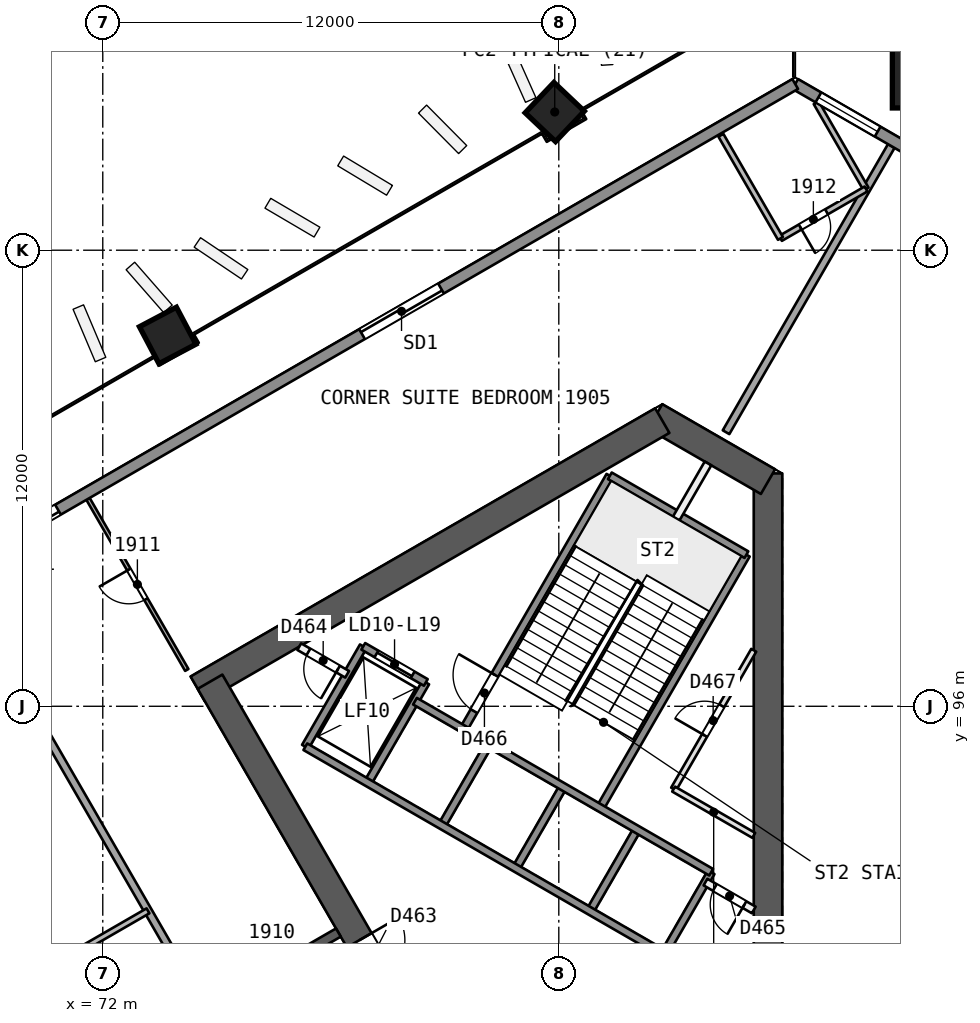
"""IFC4 building model, lengths in metres.
Left out: names, types, materials, properties, quantities, classifications, styles, units other than length and angle.
Written with IfcOpenShell. Run it as: python <this file> out.ifc"""

import sys

from ifc_helpers import new_model, si_unit, direction, frame, frame_2d, origin, origin_2d, place, context, subcontext, project, spatial, rectangle, extrude, element, fill, save


model = new_model("IFC4")
c1 = context("Model", 3, precision=1e-05, world=origin(), true_north=direction((0.0, 1.0)))
c2 = subcontext(c1, "Body", "Model", "MODEL_VIEW")
j1 = project(units=[si_unit("LENGTHUNIT", "METRE"), si_unit("PLANEANGLEUNIT", "RADIAN")], contexts=[c1])
p1 = place(None, origin())
s1 = spatial("IfcSite", under=j1, at=p1, CompositionType="ELEMENT")
p2 = place(p1, origin())
s2 = spatial("IfcBuilding", under=s1, at=p2, CompositionType="ELEMENT")
p3 = place(p2, frame((0.0, 0.0, 83.2)))
s3 = spatial("IfcBuildingStorey", under=s2, at=p3, CompositionType="ELEMENT", Elevation=83.2)
p4 = place(p3, frame((89.505, 88.169, 0.0), z_axis=(0.0, 0.0, 1.0), x_axis=(0.0, 1.0, 0.0)))
e1 = element("IfcWall", 1, at=p4, inside=s3, PredefinedType="SHEAR", context=c2, shape_type="SweptSolid", body=[
    extrude(rectangle(XDim=13.958, YDim=0.75, at=frame_2d((6.979, 0.0))), origin(), (0.0, 0.0, 1.0), 3.7),
])
p5 = place(p3, frame((89.505, 101.911, 0.0), z_axis=(0.0, 0.0, 1.0), x_axis=(-0.866017201164, 0.500014207086, 0.0)))
e2 = element("IfcWall", 2, at=p5, inside=s3, PredefinedType="SHEAR", context=c2, shape_type="SweptSolid", body=[
    extrude(rectangle(XDim=3.429, YDim=0.75, at=frame_2d((1.714, 0.0))), origin(), (0.0, 0.0, 1.0), 3.7),
])
p6 = place(p3, frame((86.723, 103.517, 0.0), z_axis=(0.0, 0.0, 1.0), x_axis=(-0.866020851292, -0.500007885066, 0.0)))
e3 = element("IfcWall", 3, at=p6, inside=s3, PredefinedType="SHEAR", context=c2, shape_type="SweptSolid", body=[
    extrude(rectangle(XDim=14.117, YDim=0.75, at=frame_2d((7.059, 0.0))), origin(), (0.0, 0.0, 1.0), 3.7),
])
p7 = place(p3, frame((74.822, 96.646, 0.0), z_axis=(0.0, 0.0, 1.0), x_axis=(0.499997052475, -0.866027105532, 0.0)))
e4 = element("IfcWall", 4, at=p7, inside=s3, PredefinedType="SHEAR", context=c2, shape_type="SweptSolid", body=[
    extrude(rectangle(XDim=10.005, YDim=0.75, at=frame_2d((5.002, 0.0))), origin(), (0.0, 0.0, 1.0), 3.7),
])
p8 = place(p7, frame((7.855, 0.0, 0.0)))
e5 = element("IfcOpeningElement", 5, at=p8, cuts=e4, PredefinedType="OPENING", context=c2, shape_type="SweptSolid", body=[
    extrude(rectangle(XDim=1.2, YDim=2.1, at=frame_2d((0.6, 1.05))), frame((0.0, 0.385, 0.0), z_axis=(0.0, -1.0, 0.0), x_axis=(1.0, 0.0, 0.0)), (0.0, 0.0, 1.0), 0.771),
])
p9 = place(p3, frame((78.2, 90.046, 0.0), z_axis=(0.0, 0.0, 1.0), x_axis=(-0.866026492143, -0.499998114903, 0.0)))
e6 = element("IfcWall", 6, at=p9, inside=s3, PredefinedType="SHEAR", context=c2, shape_type="SweptSolid", body=[
    extrude(rectangle(XDim=15.588, YDim=0.25, at=frame_2d((7.794, 0.0))), origin(), (0.0, 0.0, 1.0), 3.2),
])
p10 = place(p9, frame((1.527, 0.0, 0.0)))
e7 = element("IfcOpeningElement", 7, at=p10, cuts=e6, PredefinedType="OPENING", context=c2, shape_type="SweptSolid", body=[
    extrude(rectangle(XDim=1.0, YDim=2.1, at=frame_2d((0.5, 1.05))), frame((0.0, 0.135, 0.0), z_axis=(0.0, -1.0, 0.0), x_axis=(1.0, 0.0, 0.0)), (0.0, 0.0, 1.0), 0.271),
])
p11 = place(p9, frame((8.227, 0.0, 0.0)))
e8 = element("IfcOpeningElement", 8, at=p11, cuts=e6, PredefinedType="OPENING", context=c2, shape_type="SweptSolid", body=[
    extrude(rectangle(XDim=1.1, YDim=2.1, at=frame_2d((0.55, 1.05))), frame((0.0, 0.135, 0.0), z_axis=(0.0, -1.0, 0.0), x_axis=(1.0, 0.0, 0.0)), (0.0, 0.0, 1.0), 0.271),
])
p12 = place(p9, frame((12.594, 0.0, 0.0)))
e9 = element("IfcOpeningElement", 9, at=p12, cuts=e6, PredefinedType="OPENING", context=c2, shape_type="SweptSolid", body=[
    extrude(rectangle(XDim=1.0, YDim=2.1, at=frame_2d((0.5, 1.05))), frame((0.0, 0.135, 0.0), z_axis=(0.0, -1.0, 0.0), x_axis=(1.0, 0.0, 0.0)), (0.0, 0.0, 1.0), 0.271),
])
p13 = place(p3, frame((94.098, 113.079, 0.0), z_axis=(-0.017607037296, -0.030466109479, 0.999380712447), x_axis=(0.86581098392, -0.500371202332, 2.457e-09)))
e10 = element("IfcColumn", 10, at=p13, inside=s3, PredefinedType="COLUMN", context=c2, shape_type="SweptSolid", body=[
    extrude(rectangle(XDim=2.6, YDim=2.6, at=origin_2d()), origin(), (0.0, 0.0, 1.0), 3.702),
])
p14 = place(p3, frame((83.903, 111.67, 0.0), z_axis=(-0.00837646992, -0.028097450282, 0.999570091609), x_axis=(0.866168540849, 0.499298149106, 0.021293593943)))
e11 = element("IfcColumn", 11, at=p14, inside=s3, PredefinedType="COLUMN", context=c2, shape_type="SweptSolid", body=[
    extrude(rectangle(XDim=1.1, YDim=1.1, at=origin_2d()), origin(), (0.0, 0.0, 1.0), 3.702),
])
p15 = place(p3, frame((73.708, 105.784, 0.0), z_axis=(0.000857578916, -0.022824792675, 0.999739112668), x_axis=(0.866054076895, 0.49983648719, 0.010668737814)))
e12 = element("IfcColumn", 12, at=p15, inside=s3, PredefinedType="COLUMN", context=c2, shape_type="SweptSolid", body=[
    extrude(rectangle(XDim=1.1, YDim=1.1, at=origin_2d()), origin(), (0.0, 0.0, 1.0), 3.701),
])
p16 = place(p3, frame((92.749, 110.742, 0.0), z_axis=(0.0, 0.0, 1.0), x_axis=(-0.499980071345, -0.866036909293, 0.0)))
e13 = element("IfcWall", 13, at=p16, inside=s3, PredefinedType="PARTITIONING", context=c2, shape_type="SweptSolid", body=[
    extrude(rectangle(XDim=8.696, YDim=0.2, at=frame_2d((4.348, 0.0))), origin(), (0.0, 0.0, 1.0), 3.2),
])
p17 = place(p3, frame((74.21, 96.956, 0.0), z_axis=(0.0, 0.0, 1.0), x_axis=(-0.499973171224, 0.866040892832, 0.0)))
e14 = element("IfcWall", 14, at=p17, inside=s3, PredefinedType="PARTITIONING", context=c2, shape_type="SweptSolid", body=[
    extrude(rectangle(XDim=5.198, YDim=0.1, at=frame_2d((2.599, 0.0))), origin(), (0.0, 0.0, 1.0), 3.2),
])
p18 = place(p17, frame((2.149, 0.0, 0.0)))
e15 = element("IfcOpeningElement", 15, at=p18, cuts=e14, PredefinedType="OPENING", context=c2, shape_type="SweptSolid", body=[
    extrude(rectangle(XDim=0.9, YDim=2.1, at=frame_2d((0.45, 1.05))), frame((0.0, 0.061, 0.0), z_axis=(0.0, -1.0, 0.0), x_axis=(1.0, 0.0, 0.0)), (0.0, 0.0, 1.0), 0.121),
])
p19 = place(p3, frame((68.102, 99.431, 0.0), z_axis=(0.0, 0.0, 1.0), x_axis=(0.499992964734, -0.866029465559, 0.0)))
e16 = element("IfcWall", 16, at=p19, inside=s3, PredefinedType="PARTITIONING", context=c2, shape_type="SweptSolid", body=[
    extrude(rectangle(XDim=13.177, YDim=0.2, at=frame_2d((6.588, 0.0))), origin(), (0.0, 0.0, 1.0), 3.2),
])
p20 = place(p3, frame((90.772, 111.883, 0.0), z_axis=(0.0, 0.0, 1.0), x_axis=(0.500041944083, -0.866001186003, 0.0)))
e17 = element("IfcWall", 17, at=p20, inside=s3, PredefinedType="PARTITIONING", context=c2, shape_type="SweptSolid", body=[
    extrude(rectangle(XDim=2.624, YDim=0.15, at=frame_2d((1.312, 0.0))), origin(), (0.0, 0.0, 1.0), 3.2),
])
p21 = place(p3, frame((92.084, 109.611, 0.0), z_axis=(0.0, 0.0, 1.0), x_axis=(-0.866021400173, -0.500006934395, 0.0)))
e18 = element("IfcWall", 18, at=p21, inside=s3, PredefinedType="PARTITIONING", context=c2, shape_type="SweptSolid", body=[
    extrude(rectangle(XDim=2.6, YDim=0.15, at=frame_2d((1.3, 0.0))), origin(), (0.0, 0.0, 1.0), 3.2),
])
p22 = place(p21, frame((1.2, 0.0, 0.0)))
e19 = element("IfcOpeningElement", 19, at=p22, cuts=e18, PredefinedType="OPENING", context=c2, shape_type="SweptSolid", body=[
    extrude(rectangle(XDim=0.8, YDim=2.1, at=frame_2d((0.4, 1.05))), frame((0.0, 0.085, 0.0), z_axis=(0.0, -1.0, 0.0), x_axis=(1.0, 0.0, 0.0)), (0.0, 0.0, 1.0), 0.171),
])
p23 = place(p3, frame((89.833, 108.311, 0.0), z_axis=(0.0, 0.0, 1.0), x_axis=(-0.499967424082, 0.866044210682, 0.0)))
e20 = element("IfcWall", 20, at=p23, inside=s3, PredefinedType="PARTITIONING", context=c2, shape_type="SweptSolid", body=[
    extrude(rectangle(XDim=3.135, YDim=0.15, at=frame_2d((1.567, 0.0))), origin(), (0.0, 0.0, 1.0), 3.2),
])
p24 = place(p3, frame((70.678, 89.167, 0.0), z_axis=(0.0, 0.0, 1.0), x_axis=(0.866032775405, 0.499987231761, 0.0)))
e21 = element("IfcWall", 21, at=p24, inside=s3, PredefinedType="PARTITIONING", context=c2, shape_type="SweptSolid", body=[
    extrude(rectangle(XDim=2.9, YDim=0.15, at=frame_2d((1.45, 0.0))), origin(), (0.0, 0.0, 1.0), 3.2),
])
p25 = place(p3, frame((90.221, 112.374, 0.0), z_axis=(0.0, 0.0, 1.0), x_axis=(0.866027298819, -0.49999671769, 0.0)))
e22 = element("IfcWall", 22, at=p25, inside=s3, PredefinedType="SOLIDWALL", context=c2, shape_type="SweptSolid", body=[
    extrude(rectangle(XDim=6.01, YDim=0.3, at=frame_2d((3.005, 0.0))), origin(), (0.0, 0.0, 1.0), 3.2),
])
p26 = place(p25, frame((0.705, 0.0, 0.9)))
e23 = element("IfcOpeningElement", 23, at=p26, cuts=e22, PredefinedType="OPENING", context=c2, shape_type="SweptSolid", body=[
    extrude(rectangle(XDim=1.8, YDim=1.5, at=frame_2d((0.9, 0.75))), frame((0.0, 0.161, 0.0), z_axis=(0.0, -1.0, 0.0), x_axis=(1.0, 0.0, 0.0)), (0.0, 0.0, 1.0), 0.321),
])
p27 = place(p25, frame((3.651, 0.0, 0.9)))
e24 = element("IfcOpeningElement", 24, at=p27, cuts=e22, PredefinedType="OPENING", context=c2, shape_type="SweptSolid", body=[
    extrude(rectangle(XDim=1.8, YDim=1.5, at=frame_2d((0.9, 0.75))), frame((0.0, 0.161, 0.0), z_axis=(0.0, -1.0, 0.0), x_axis=(1.0, 0.0, 0.0)), (0.0, 0.0, 1.0), 0.321),
])
p28 = place(p3, frame((39.353, 83.005, 0.0), z_axis=(0.0, 0.0, 1.0), x_axis=(0.866025832118, 0.499999258104, 0.0)))
e25 = element("IfcWall", 25, at=p28, inside=s3, PredefinedType="SOLIDWALL", context=c2, shape_type="SweptSolid", body=[
    extrude(rectangle(XDim=58.737, YDim=0.3, at=frame_2d((29.368, 0.0))), origin(), (0.0, 0.0, 1.0), 3.2),
])
p29 = place(p28, frame((28.636, 0.0, 0.0)))
e26 = element("IfcOpeningElement", 26, at=p29, cuts=e25, PredefinedType="OPENING", context=c2, shape_type="SweptSolid", body=[
    extrude(rectangle(XDim=2.4, YDim=2.4, at=frame_2d((1.2, 1.2))), frame((0.0, 0.161, 0.0), z_axis=(0.0, -1.0, 0.0), x_axis=(1.0, 0.0, 0.0)), (0.0, 0.0, 1.0), 0.321),
])
p30 = place(p28, frame((33.936, 0.0, 0.0)))
e27 = element("IfcOpeningElement", 27, at=p30, cuts=e25, PredefinedType="OPENING", context=c2, shape_type="SweptSolid", body=[
    extrude(rectangle(XDim=2.4, YDim=2.4, at=frame_2d((1.2, 1.2))), frame((0.0, 0.161, 0.0), z_axis=(0.0, -1.0, 0.0), x_axis=(1.0, 0.0, 0.0)), (0.0, 0.0, 1.0), 0.321),
])
p31 = place(p28, frame((45.575, 0.0, 0.0)))
e28 = element("IfcOpeningElement", 28, at=p31, cuts=e25, PredefinedType="OPENING", context=c2, shape_type="SweptSolid", body=[
    extrude(rectangle(XDim=2.4, YDim=2.4, at=frame_2d((1.2, 1.2))), frame((0.0, 0.161, 0.0), z_axis=(0.0, -1.0, 0.0), x_axis=(1.0, 0.0, 0.0)), (0.0, 0.0, 1.0), 0.321),
])
p32 = place(p28, frame((22.868, 0.0, 0.0)))
e29 = element("IfcOpeningElement", 29, at=p32, cuts=e25, PredefinedType="OPENING", context=c2, shape_type="SweptSolid", body=[
    extrude(rectangle(XDim=2.4, YDim=2.4, at=frame_2d((1.2, 1.2))), frame((0.0, 0.161, 0.0), z_axis=(0.0, -1.0, 0.0), x_axis=(1.0, 0.0, 0.0)), (0.0, 0.0, 1.0), 0.321),
])
p33 = place(p28, frame((10.765, 0.0, 0.0)))
e30 = element("IfcOpeningElement", 30, at=p33, cuts=e25, PredefinedType="OPENING", context=c2, shape_type="SweptSolid", body=[
    extrude(rectangle(XDim=2.4, YDim=2.4, at=frame_2d((1.2, 1.2))), frame((0.0, 0.161, 0.0), z_axis=(0.0, -1.0, 0.0), x_axis=(1.0, 0.0, 0.0)), (0.0, 0.0, 1.0), 0.321),
])
p34 = place(p3, frame((86.77, 89.486, 0.0), z_axis=(0.0, 0.0, 1.0), x_axis=(0.499961042966, 0.86604789447, 0.0)))
e31 = element("IfcWall", 31, at=p34, inside=s3, PredefinedType="SOLIDWALL", context=c2, shape_type="SweptSolid", body=[
    extrude(rectangle(XDim=2.48, YDim=0.2, at=frame_2d((1.24, 0.0))), origin(), (0.0, 0.0, 1.0), 3.2),
])
p35 = place(p3, frame((87.021, 93.821, 0.0), z_axis=(0.0, 0.0, 1.0), x_axis=(0.499986337096, 0.866033291922, 0.0)))
e32 = element("IfcWall", 32, at=p35, inside=s3, PredefinedType="PARTITIONING", context=c2, shape_type="SweptSolid", body=[
    extrude(rectangle(XDim=4.218, YDim=0.15, at=frame_2d((2.109, 0.0))), origin(), (0.0, 0.0, 1.0), 3.2),
])
p36 = place(p35, frame((1.631, 0.0, 0.0)))
e33 = element("IfcOpeningElement", 33, at=p36, cuts=e32, PredefinedType="OPENING", context=c2, shape_type="SweptSolid", body=[
    extrude(rectangle(XDim=0.9, YDim=2.1, at=frame_2d((0.45, 1.05))), frame((0.0, 0.085, 0.0), z_axis=(0.0, -1.0, 0.0), x_axis=(1.0, 0.0, 0.0)), (0.0, 0.0, 1.0), 0.171),
])
p37 = place(p3, frame((84.821, 90.611, 0.0), z_axis=(0.0, 0.0, 1.0), x_axis=(0.499961042966, 0.86604789447, 0.0)))
e34 = element("IfcWall", 34, at=p37, inside=s3, PredefinedType="SOLIDWALL", context=c2, shape_type="SweptSolid", body=[
    extrude(rectangle(XDim=2.48, YDim=0.2, at=frame_2d((1.24, 0.0))), origin(), (0.0, 0.0, 1.0), 3.2),
])
p38 = place(p3, frame((85.087, 93.321, 0.0), z_axis=(0.0, 0.0, 1.0), x_axis=(0.500019787375, 0.866013979237, 0.0)))
e35 = element("IfcWall", 35, at=p38, inside=s3, PredefinedType="SOLIDWALL", context=c2, shape_type="SweptSolid", body=[
    extrude(rectangle(XDim=7.7, YDim=0.2, at=frame_2d((3.85, 0.0))), origin(), (0.0, 0.0, 1.0), 3.2),
])
p39 = place(p3, frame((82.873, 91.736, 0.0), z_axis=(0.0, 0.0, 1.0), x_axis=(0.499961042966, 0.86604789447, 0.0)))
e36 = element("IfcWall", 36, at=p39, inside=s3, PredefinedType="SOLIDWALL", context=c2, shape_type="SweptSolid", body=[
    extrude(rectangle(XDim=2.48, YDim=0.2, at=frame_2d((1.24, 0.0))), origin(), (0.0, 0.0, 1.0), 3.2),
])
p40 = place(p3, frame((87.09, 100.94, 0.0), z_axis=(0.0, 0.0, 1.0), x_axis=(0.499937194881, 0.866061661301, 0.0)))
e37 = element("IfcWall", 37, at=p40, inside=s3, PredefinedType="PARTITIONING", context=c2, shape_type="SweptSolid", body=[
    extrude(rectangle(XDim=1.673, YDim=0.2, at=frame_2d((0.836, 0.0))), origin(), (0.0, 0.0, 1.0), 3.2),
])
p41 = place(p3, frame((80.924, 92.861, 0.0), z_axis=(0.0, 0.0, 1.0), x_axis=(0.499961042966, 0.86604789447, 0.0)))
e38 = element("IfcWall", 38, at=p41, inside=s3, PredefinedType="SOLIDWALL", context=c2, shape_type="SweptSolid", body=[
    extrude(rectangle(XDim=2.48, YDim=0.2, at=frame_2d((1.24, 0.0))), origin(), (0.0, 0.0, 1.0), 3.2),
])
p42 = place(p3, frame((81.493, 95.396, 0.0), z_axis=(0.0, 0.0, 1.0), x_axis=(0.500006057782, 0.866021906294, 0.0)))
e39 = element("IfcWall", 39, at=p42, inside=s3, PredefinedType="SOLIDWALL", context=c2, shape_type="SweptSolid", body=[
    extrude(rectangle(XDim=7.7, YDim=0.2, at=frame_2d((3.85, 0.0))), origin(), (0.0, 0.0, 1.0), 3.2),
])
p43 = place(p42, frame((0.55, 0.0, 0.0)))
e40 = element("IfcOpeningElement", 40, at=p43, cuts=e39, PredefinedType="OPENING", context=c2, shape_type="SweptSolid", body=[
    extrude(rectangle(XDim=1.1, YDim=2.1, at=frame_2d((0.55, 1.05))), frame((0.0, 0.11, 0.0), z_axis=(0.0, -1.0, 0.0), x_axis=(1.0, 0.0, 0.0)), (0.0, 0.0, 1.0), 0.221),
])
for number, where, z_axis, x_axis in (
    (41, (78.976, 93.986, 0.0), (0.0, 0.0, 1.0), (0.5, 0.866, 0.0)),
    (42, (77.33, 94.936, 0.0), (0.0, 0.0, 1.0), (0.5, 0.866, 0.0)),
):
    element("IfcWall", number, at=place(p3, frame(where, z_axis=z_axis, x_axis=x_axis)), inside=s3, PredefinedType="SOLIDWALL", context=c2, shape_type="SweptSolid", body=[
        extrude(rectangle(XDim=3.05, YDim=0.2, at=frame_2d((1.525, 0.0))), origin(), (0.0, 0.0, 1.0), 3.2),
    ])
p44 = place(p3, frame((86.77, 89.486, 0.0), z_axis=(0.0, 0.0, 1.0), x_axis=(-0.86601811187, 0.500012629753, 0.0)))
e43 = element("IfcWall", 43, at=p44, inside=s3, PredefinedType="SOLIDWALL", context=c2, shape_type="SweptSolid", body=[
    extrude(rectangle(XDim=10.9, YDim=0.2, at=frame_2d((5.45, 0.0))), origin(), (0.0, 0.0, 1.0), 3.2),
])
p45 = place(p3, frame((89.13, 90.641, 0.0), z_axis=(0.0, 0.0, 1.0), x_axis=(-0.866094119867, 0.499880961361, 0.0)))
e44 = element("IfcWall", 44, at=p45, inside=s3, PredefinedType="PARTITIONING", context=c2, shape_type="SweptSolid", body=[
    extrude(rectangle(XDim=1.467, YDim=0.2, at=frame_2d((0.733, 0.0))), origin(), (0.0, 0.0, 1.0), 3.2),
])
p46 = place(p45, frame((0.283, 0.0, 0.0)))
e45 = element("IfcOpeningElement", 45, at=p46, cuts=e44, PredefinedType="OPENING", context=c2, shape_type="SweptSolid", body=[
    extrude(rectangle(XDim=0.9, YDim=2.1, at=frame_2d((0.45, 1.05))), frame((0.0, 0.11, 0.0), z_axis=(0.0, -1.0, 0.0), x_axis=(1.0, 0.0, 0.0)), (0.0, 0.0, 1.0), 0.221),
])
p47 = place(p3, frame((78.43, 96.841, 0.0), z_axis=(0.0, 0.0, 1.0), x_axis=(-0.866045896294, 0.499964504253, 0.0)))
e46 = element("IfcWall", 46, at=p47, inside=s3, PredefinedType="PARTITIONING", context=c2, shape_type="SweptSolid", body=[
    extrude(rectangle(XDim=1.455, YDim=0.2, at=frame_2d((0.728, 0.0))), origin(), (0.0, 0.0, 1.0), 3.2),
])
p48 = place(p47, frame((0.278, 0.0, 0.0)))
e47 = element("IfcOpeningElement", 47, at=p48, cuts=e46, PredefinedType="OPENING", context=c2, shape_type="SweptSolid", body=[
    extrude(rectangle(XDim=0.9, YDim=2.1, at=frame_2d((0.45, 1.05))), frame((0.0, 0.11, 0.0), z_axis=(0.0, -1.0, 0.0), x_axis=(1.0, 0.0, 0.0)), (0.0, 0.0, 1.0), 0.221),
])
p49 = place(p3, frame((88.01, 91.634, 0.0), z_axis=(0.0, 0.0, 1.0), x_axis=(-0.866024315419, 0.5000018851, 0.0)))
e48 = element("IfcWall", 48, at=p49, inside=s3, PredefinedType="SOLIDWALL", context=c2, shape_type="SweptSolid", body=[
    extrude(rectangle(XDim=9.0, YDim=0.2, at=frame_2d((4.5, 0.0))), origin(), (0.0, 0.0, 1.0), 3.2),
])
p50 = place(p3, frame((80.5, 96.627, 0.0), z_axis=(0.0, 0.0, 1.0), x_axis=(-0.86601224135, 0.500022797313, 0.0)))
e49 = element("IfcWall", 49, at=p50, inside=s3, PredefinedType="SOLIDWALL", context=c2, shape_type="SweptSolid", body=[
    extrude(rectangle(XDim=1.9, YDim=0.2, at=frame_2d((0.95, 0.0))), origin(), (0.0, 0.0, 1.0), 3.2),
])
p51 = place(p50, frame((0.4, 0.0, 0.0)))
e50 = element("IfcOpeningElement", 50, at=p51, cuts=e49, PredefinedType="OPENING", context=c2, shape_type="SweptSolid", body=[
    extrude(rectangle(XDim=1.1, YDim=2.1, at=frame_2d((0.55, 1.05))), frame((0.0, 0.11, 0.0), z_axis=(0.0, -1.0, 0.0), x_axis=(1.0, 0.0, 0.0)), (0.0, 0.0, 1.0), 0.221),
])
p52 = place(p3, frame((89.13, 92.604, 0.0), z_axis=(0.0, 0.0, 1.0), x_axis=(-0.866057046432, 0.499945189322, 0.0)))
e51 = element("IfcWall", 51, at=p52, inside=s3, PredefinedType="PARTITIONING", context=c2, shape_type="SweptSolid", body=[
    extrude(rectangle(XDim=2.435, YDim=0.15, at=frame_2d((1.218, 0.0))), origin(), (0.0, 0.0, 1.0), 3.2),
])
p53 = place(p3, frame((88.937, 99.99, 0.0), z_axis=(0.0, 0.0, 1.0), x_axis=(-0.866004344652, 0.500036473714, 0.0)))
e52 = element("IfcWall", 52, at=p53, inside=s3, PredefinedType="SOLIDWALL", context=c2, shape_type="SweptSolid", body=[
    extrude(rectangle(XDim=4.15, YDim=0.2, at=frame_2d((2.075, 0.0))), origin(), (0.0, 0.0, 1.0), 3.2),
])
p54 = place(p18, origin())
e53 = element("IfcDoor", 53, at=p54, inside=s3, OperationType="SINGLE_SWING_RIGHT", PredefinedType="NOTDEFINED", context=c2, shape_type="SweptSolid", body=[
    extrude(rectangle(XDim=0.9, YDim=2.1, at=frame_2d((0.45, 1.05))), frame((0.0, 0.025, 0.0), z_axis=(0.0, -1.0, 0.0), x_axis=(1.0, 0.0, 0.0)), (0.0, 0.0, 1.0), 0.05),
])
fill(e15, e53)
p55 = place(p22, origin())
e54 = element("IfcDoor", 54, at=p55, inside=s3, OperationType="SINGLE_SWING_RIGHT", PredefinedType="NOTDEFINED", context=c2, shape_type="SweptSolid", body=[
    extrude(rectangle(XDim=0.8, YDim=2.1, at=frame_2d((0.4, 1.05))), frame((0.0, 0.025, 0.0), z_axis=(0.0, -1.0, 0.0), x_axis=(1.0, 0.0, 0.0)), (0.0, 0.0, 1.0), 0.05),
])
fill(e19, e54)
p56 = place(p26, origin())
e55 = element("IfcWindow", 55, at=p56, inside=s3, PartitioningType="SINGLE_PANEL", PredefinedType="WINDOW", context=c2, shape_type="SweptSolid", body=[
    extrude(rectangle(XDim=1.8, YDim=1.5, at=frame_2d((0.9, 0.75))), frame((0.0, 0.03, 0.0), z_axis=(0.0, -1.0, 0.0), x_axis=(1.0, 0.0, 0.0)), (0.0, 0.0, 1.0), 0.06),
])
fill(e23, e55)
p57 = place(p30, origin())
e56 = element("IfcDoor", 56, at=p57, inside=s3, OperationType="SLIDING_TO_RIGHT", PredefinedType="NOTDEFINED", context=c2, shape_type="SweptSolid", body=[
    extrude(rectangle(XDim=2.4, YDim=2.4, at=frame_2d((1.2, 1.2))), frame((0.0, 0.025, 0.0), z_axis=(0.0, -1.0, 0.0), x_axis=(1.0, 0.0, 0.0)), (0.0, 0.0, 1.0), 0.05),
])
fill(e27, e56)
p58 = place(p31, origin())
e57 = element("IfcDoor", 57, at=p58, inside=s3, OperationType="SLIDING_TO_LEFT", PredefinedType="NOTDEFINED", context=c2, shape_type="SweptSolid", body=[
    extrude(rectangle(XDim=2.4, YDim=2.4, at=frame_2d((1.2, 1.2))), frame((0.0, 0.025, 0.0), z_axis=(0.0, -1.0, 0.0), x_axis=(1.0, 0.0, 0.0)), (0.0, 0.0, 1.0), 0.05),
])
fill(e28, e57)
p59 = place(p8, origin())
e58 = element("IfcDoor", 58, at=p59, inside=s3, OperationType="SINGLE_SWING_LEFT", PredefinedType="NOTDEFINED", context=c2, shape_type="SweptSolid", body=[
    extrude(rectangle(XDim=1.2, YDim=2.1, at=frame_2d((0.6, 1.05))), frame((0.0, 0.025, 0.0), z_axis=(0.0, -1.0, 0.0), x_axis=(1.0, 0.0, 0.0)), (0.0, 0.0, 1.0), 0.05),
])
fill(e5, e58)
p60 = place(p51, origin())
e59 = element("IfcDoor", 59, at=p60, inside=s3, OperationType="SLIDING_TO_RIGHT", PredefinedType="NOTDEFINED", context=c2, shape_type="SweptSolid", body=[
    extrude(rectangle(XDim=1.1, YDim=2.1, at=frame_2d((0.55, 1.05))), frame((0.0, 0.025, 0.0), z_axis=(0.0, -1.0, 0.0), x_axis=(1.0, 0.0, 0.0)), (0.0, 0.0, 1.0), 0.05),
])
fill(e50, e59)
p61 = place(p48, origin())
e60 = element("IfcDoor", 60, at=p61, inside=s3, OperationType="SINGLE_SWING_LEFT", PredefinedType="NOTDEFINED", context=c2, shape_type="SweptSolid", body=[
    extrude(rectangle(XDim=0.9, YDim=2.1, at=frame_2d((0.45, 1.05))), frame((0.0, 0.025, 0.0), z_axis=(0.0, -1.0, 0.0), x_axis=(1.0, 0.0, 0.0)), (0.0, 0.0, 1.0), 0.05),
])
fill(e47, e60)
p62 = place(p46, origin())
e61 = element("IfcDoor", 61, at=p62, inside=s3, OperationType="SINGLE_SWING_LEFT", PredefinedType="NOTDEFINED", context=c2, shape_type="SweptSolid", body=[
    extrude(rectangle(XDim=0.9, YDim=2.1, at=frame_2d((0.45, 1.05))), frame((0.0, 0.025, 0.0), z_axis=(0.0, -1.0, 0.0), x_axis=(1.0, 0.0, 0.0)), (0.0, 0.0, 1.0), 0.05),
])
fill(e45, e61)
p63 = place(p43, origin())
e62 = element("IfcDoor", 62, at=p63, inside=s3, OperationType="SINGLE_SWING_RIGHT", PredefinedType="NOTDEFINED", context=c2, shape_type="SweptSolid", body=[
    extrude(rectangle(XDim=1.1, YDim=2.1, at=frame_2d((0.55, 1.05))), frame((0.0, 0.025, 0.0), z_axis=(0.0, -1.0, 0.0), x_axis=(1.0, 0.0, 0.0)), (0.0, 0.0, 1.0), 0.05),
])
fill(e40, e62)
p64 = place(p36, origin())
e63 = element("IfcDoor", 63, at=p64, inside=s3, OperationType="SINGLE_SWING_LEFT", PredefinedType="NOTDEFINED", context=c2, shape_type="SweptSolid", body=[
    extrude(rectangle(XDim=0.9, YDim=2.1, at=frame_2d((0.45, 1.05))), frame((0.0, 0.025, 0.0), z_axis=(0.0, -1.0, 0.0), x_axis=(1.0, 0.0, 0.0)), (0.0, 0.0, 1.0), 0.05),
])
fill(e33, e63)
save(model, sys.argv[1])
